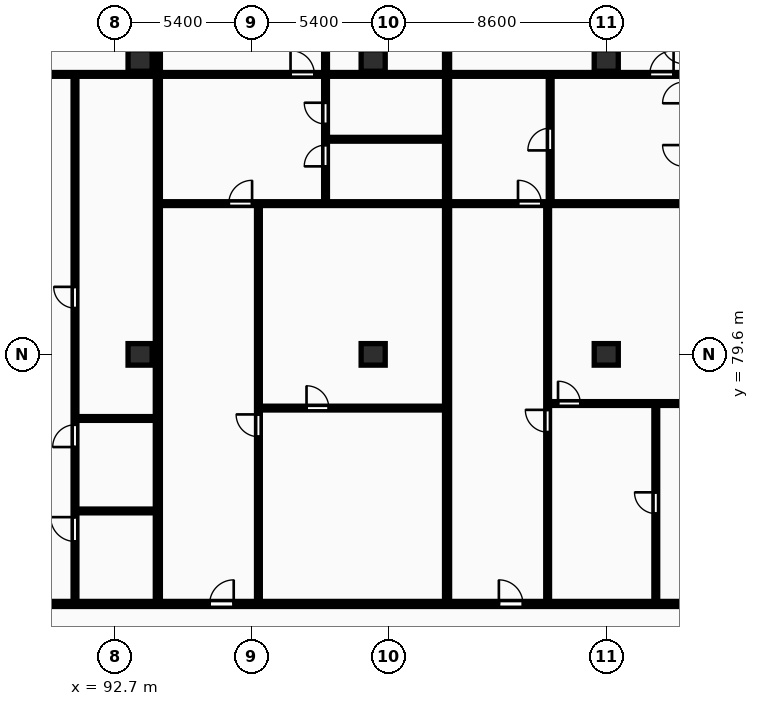
"""IFC4 building model, lengths in metres.
Left out: names, types, materials, properties, quantities, classifications, styles, units other than length and angle.
Written with IfcOpenShell. Run it as: python <this file> out.ifc"""

import sys

from ifc_helpers import new_model, si_unit, direction, frame, frame_2d, origin, origin_2d, place, context, subcontext, project, spatial, rectangle, extrude, element, fill, save


model = new_model("IFC4")
c1 = context("Model", 3, precision=1e-05, world=origin(), true_north=direction((0.0, 1.0)))
c2 = subcontext(c1, "Body", "Model", "MODEL_VIEW")
j1 = project(units=[si_unit("LENGTHUNIT", "METRE"), si_unit("PLANEANGLEUNIT", "RADIAN")], contexts=[c1])
p1 = place(None, origin())
s1 = spatial("IfcSite", under=j1, at=p1, CompositionType="ELEMENT")
p2 = place(p1, origin())
s2 = spatial("IfcBuilding", under=s1, at=p2, CompositionType="ELEMENT")
p3 = place(p2, frame((0.0, 0.0, 106.8)))
s3 = spatial("IfcBuildingStorey", under=s2, at=p3, CompositionType="ELEMENT", Elevation=106.8)
for number, where, z_axis, x_axis in (
    (1, (93.7, 79.6, 0.0), (0.0, 0.0, 1.0), (1.0, 0.0, 0.0)),
    (2, (93.7, 91.2, 0.0), (0.0, 0.0, 1.0), (1.0, 0.0, 0.0)),
    (3, (102.9, 79.6, 0.0), (0.0, 0.0, 1.0), (1.0, 0.0, 0.0)),
    (4, (102.9, 91.2, 0.0), (0.0, 0.0, 1.0), (1.0, 0.0, 0.0)),
    (5, (112.1, 79.6, 0.0), (0.0, 0.0, 1.0), (1.0, 0.0, 0.0)),
    (6, (112.1, 91.2, 0.0), (0.0, 0.0, 1.0), (1.0, 0.0, 0.0)),
):
    element("IfcColumn", number, at=place(p3, frame(where, z_axis=z_axis, x_axis=x_axis)), inside=s3, PredefinedType="COLUMN", context=c2, shape_type="SweptSolid", body=[
        extrude(rectangle(XDim=0.95, YDim=0.85, at=origin_2d()), origin(), (0.0, 0.0, 1.0), 3.25),
    ])
p4 = place(p3, frame((94.401, 69.83, 0.0), z_axis=(0.0, 0.0, 1.0), x_axis=(0.0, 1.0, 0.0)))
e7 = element("IfcWall", 7, at=p4, inside=s3, PredefinedType="PARTITIONING", context=c2, shape_type="SweptSolid", body=[
    extrude(rectangle(XDim=26.07, YDim=0.2, at=frame_2d((13.035, 0.0))), origin(), (0.0, 0.0, 1.0), 2.97),
])
for number, where, z_axis, x_axis in (
    (8, (91.191, 73.42, 0.0), (0.0, 0.0, 1.0), (1.0, 0.0, 0.0)),
    (9, (91.191, 77.07, 0.0), (0.0, 0.0, 1.0), (1.0, 0.0, 0.0)),
):
    element("IfcWall", number, at=place(p3, frame(where, z_axis=z_axis, x_axis=x_axis)), inside=s3, PredefinedType="PARTITIONING", context=c2, shape_type="SweptSolid", body=[
        extrude(rectangle(XDim=3.13, YDim=0.15, at=frame_2d((1.565, 0.0))), origin(), (0.0, 0.0, 1.0), 2.97),
    ])
p5 = place(p3, frame((91.131, 69.81, 0.0), z_axis=(0.0, 0.0, 1.0), x_axis=(0.0, 1.0, 0.0)))
e10 = element("IfcWall", 10, at=p5, inside=s3, PredefinedType="PARTITIONING", context=c2, shape_type="SweptSolid", body=[
    extrude(rectangle(XDim=20.78, YDim=0.15, at=frame_2d((10.39, 0.0))), origin(), (0.0, 0.0, 1.0), 2.97),
])
p6 = place(p5, frame((2.406, 0.0, 0.0)))
e11 = element("IfcOpeningElement", 11, at=p6, cuts=e10, PredefinedType="OPENING", context=c2, shape_type="SweptSolid", body=[
    extrude(rectangle(XDim=0.96, YDim=2.1, at=frame_2d((0.48, 1.05))), frame((0.0, 0.085, 0.0), z_axis=(0.0, -1.0, 0.0), x_axis=(1.0, 0.0, 0.0)), (0.0, 0.0, 1.0), 0.17),
])
p7 = place(p5, frame((6.133, 0.0, 0.0)))
e12 = element("IfcOpeningElement", 12, at=p7, cuts=e10, PredefinedType="OPENING", context=c2, shape_type="SweptSolid", body=[
    extrude(rectangle(XDim=0.88, YDim=2.06, at=frame_2d((0.44, 1.03))), frame((0.0, 0.085, 0.0), z_axis=(0.0, -1.0, 0.0), x_axis=(1.0, 0.0, 0.0)), (0.0, 0.0, 1.0), 0.17),
])
p8 = place(p5, frame((11.615, 0.0, 0.0)))
e13 = element("IfcOpeningElement", 13, at=p8, cuts=e10, PredefinedType="OPENING", context=c2, shape_type="SweptSolid", body=[
    extrude(rectangle(XDim=0.84, YDim=2.04, at=frame_2d((0.42, 1.02))), frame((0.0, 0.085, 0.0), z_axis=(0.0, -1.0, 0.0), x_axis=(1.0, 0.0, 0.0)), (0.0, 0.0, 1.0), 0.17),
])
p9 = place(p3, frame((75.405, 90.65, 0.0), z_axis=(0.0, 0.0, 1.0), x_axis=(1.0, 0.0, 0.0)))
e14 = element("IfcWall", 14, at=p9, inside=s3, PredefinedType="PARTITIONING", context=c2, shape_type="SweptSolid", body=[
    extrude(rectangle(XDim=18.916, YDim=0.15, at=frame_2d((9.458, 0.0))), origin(), (0.0, 0.0, 1.0), 2.97),
])
p10 = place(p9, frame((6.426, 0.0, 0.0)))
e15 = element("IfcOpeningElement", 15, at=p10, cuts=e14, PredefinedType="OPENING", context=c2, shape_type="SweptSolid", body=[
    extrude(rectangle(XDim=0.94, YDim=2.1, at=frame_2d((0.47, 1.05))), frame((0.0, 0.085, 0.0), z_axis=(0.0, -1.0, 0.0), x_axis=(1.0, 0.0, 0.0)), (0.0, 0.0, 1.0), 0.17),
])
p11 = place(p9, frame((10.856, 0.0, 0.0)))
e16 = element("IfcOpeningElement", 16, at=p11, cuts=e14, PredefinedType="OPENING", context=c2, shape_type="SweptSolid", body=[
    extrude(rectangle(XDim=0.94, YDim=2.1, at=frame_2d((0.47, 1.05))), frame((0.0, 0.085, 0.0), z_axis=(0.0, -1.0, 0.0), x_axis=(1.0, 0.0, 0.0)), (0.0, 0.0, 1.0), 0.17),
])
p12 = place(p3, frame((105.817, 69.83, 0.0), z_axis=(0.0, 0.0, 1.0), x_axis=(0.0, 1.0, 0.0)))
e17 = element("IfcWall", 17, at=p12, inside=s3, PredefinedType="PARTITIONING", context=c2, shape_type="SweptSolid", body=[
    extrude(rectangle(XDim=26.07, YDim=0.2, at=frame_2d((13.035, 0.0))), origin(), (0.0, 0.0, 1.0), 2.97),
])
p13 = place(p3, frame((98.431, 77.48, 0.0), z_axis=(0.0, 0.0, 1.0), x_axis=(1.0, 0.0, 0.0)))
e18 = element("IfcWall", 18, at=p13, inside=s3, PredefinedType="PARTITIONING", context=c2, shape_type="SweptSolid", body=[
    extrude(rectangle(XDim=7.306, YDim=0.15, at=frame_2d((3.653, 0.0))), origin(), (0.0, 0.0, 1.0), 2.97),
])
p14 = place(p13, frame((1.839, 0.0, 0.0)))
e19 = element("IfcOpeningElement", 19, at=p14, cuts=e18, PredefinedType="OPENING", context=c2, shape_type="SweptSolid", body=[
    extrude(rectangle(XDim=0.88, YDim=2.06, at=frame_2d((0.44, 1.03))), frame((0.0, 0.085, 0.0), z_axis=(0.0, -1.0, 0.0), x_axis=(1.0, 0.0, 0.0)), (0.0, 0.0, 1.0), 0.17),
])
p15 = place(p3, frame((98.371, 69.81, 0.0), z_axis=(0.0, 0.0, 1.0), x_axis=(0.0, 1.0, 0.0)))
e20 = element("IfcWall", 20, at=p15, inside=s3, PredefinedType="PARTITIONING", context=c2, shape_type="SweptSolid", body=[
    extrude(rectangle(XDim=15.7, YDim=0.15, at=frame_2d((7.85, 0.0))), origin(), (0.0, 0.0, 1.0), 2.97),
])
p16 = place(p15, frame((6.54, 0.0, 0.0)))
e21 = element("IfcOpeningElement", 21, at=p16, cuts=e20, PredefinedType="OPENING", context=c2, shape_type="SweptSolid", body=[
    extrude(rectangle(XDim=0.88, YDim=2.06, at=frame_2d((0.44, 1.03))), frame((0.0, 0.085, 0.0), z_axis=(0.0, -1.0, 0.0), x_axis=(1.0, 0.0, 0.0)), (0.0, 0.0, 1.0), 0.17),
])
p17 = place(p3, frame((101.08, 88.09, 0.0), z_axis=(0.0, 0.0, 1.0), x_axis=(1.0, 0.0, 0.0)))
e22 = element("IfcWall", 22, at=p17, inside=s3, PredefinedType="PARTITIONING", context=c2, shape_type="SweptSolid", body=[
    extrude(rectangle(XDim=4.656, YDim=0.15, at=frame_2d((2.328, 0.0))), origin(), (0.0, 0.0, 1.0), 2.97),
])
p18 = place(p3, frame((101.02, 85.59, 0.0), z_axis=(0.0, 0.0, 1.0), x_axis=(0.0, 1.0, 0.0)))
e23 = element("IfcWall", 23, at=p18, inside=s3, PredefinedType="PARTITIONING", context=c2, shape_type="SweptSolid", body=[
    extrude(rectangle(XDim=10.31, YDim=0.15, at=frame_2d((5.155, 0.0))), origin(), (0.0, 0.0, 1.0), 2.97),
])
p19 = place(p18, frame((1.43, 0.0, 0.0)))
e24 = element("IfcOpeningElement", 24, at=p19, cuts=e23, PredefinedType="OPENING", context=c2, shape_type="SweptSolid", body=[
    extrude(rectangle(XDim=0.84, YDim=2.04, at=frame_2d((0.42, 1.02))), frame((0.0, 0.085, 0.0), z_axis=(0.0, -1.0, 0.0), x_axis=(1.0, 0.0, 0.0)), (0.0, 0.0, 1.0), 0.17),
])
p20 = place(p18, frame((3.102, 0.0, 0.0)))
e25 = element("IfcOpeningElement", 25, at=p20, cuts=e23, PredefinedType="OPENING", context=c2, shape_type="SweptSolid", body=[
    extrude(rectangle(XDim=0.84, YDim=2.04, at=frame_2d((0.42, 1.02))), frame((0.0, 0.085, 0.0), z_axis=(0.0, -1.0, 0.0), x_axis=(1.0, 0.0, 0.0)), (0.0, 0.0, 1.0), 0.17),
])
p21 = place(p18, frame((7.29, 0.0, 0.0)))
e26 = element("IfcOpeningElement", 26, at=p21, cuts=e23, PredefinedType="OPENING", context=c2, shape_type="SweptSolid", body=[
    extrude(rectangle(XDim=0.88, YDim=2.06, at=frame_2d((0.44, 1.03))), frame((0.0, 0.085, 0.0), z_axis=(0.0, -1.0, 0.0), x_axis=(1.0, 0.0, 0.0)), (0.0, 0.0, 1.0), 0.17),
])
p22 = place(p3, frame((94.481, 85.55, 0.0), z_axis=(0.0, 0.0, 1.0), x_axis=(1.0, 0.0, 0.0)))
e27 = element("IfcWall", 27, at=p22, inside=s3, PredefinedType="PARTITIONING", context=c2, shape_type="SweptSolid", body=[
    extrude(rectangle(XDim=11.256, YDim=0.15, at=frame_2d((5.628, 0.0))), origin(), (0.0, 0.0, 1.0), 2.97),
])
p23 = place(p22, frame((2.72, 0.0, 0.0)))
e28 = element("IfcOpeningElement", 28, at=p23, cuts=e27, PredefinedType="OPENING", context=c2, shape_type="SweptSolid", body=[
    extrude(rectangle(XDim=0.92, YDim=2.08, at=frame_2d((0.46, 1.04))), frame((0.0, 0.085, 0.0), z_axis=(0.0, -1.0, 0.0), x_axis=(1.0, 0.0, 0.0)), (0.0, 0.0, 1.0), 0.17),
])
p24 = place(p3, frame((94.481, 90.65, 0.0), z_axis=(0.0, 0.0, 1.0), x_axis=(1.0, 0.0, 0.0)))
e29 = element("IfcWall", 29, at=p24, inside=s3, PredefinedType="PARTITIONING", context=c2, shape_type="SweptSolid", body=[
    extrude(rectangle(XDim=11.256, YDim=0.15, at=frame_2d((5.628, 0.0))), origin(), (0.0, 0.0, 1.0), 2.97),
])
p25 = place(p24, frame((5.158, 0.0, 0.0)))
e30 = element("IfcOpeningElement", 30, at=p25, cuts=e29, PredefinedType="OPENING", context=c2, shape_type="SweptSolid", body=[
    extrude(rectangle(XDim=0.94, YDim=2.1, at=frame_2d((0.47, 1.05))), frame((0.0, 0.085, 0.0), z_axis=(0.0, -1.0, 0.0), x_axis=(1.0, 0.0, 0.0)), (0.0, 0.0, 1.0), 0.17),
])
p26 = place(p3, frame((114.055, 69.81, 0.0), z_axis=(0.0, 0.0, 1.0), x_axis=(0.0, 1.0, 0.0)))
e31 = element("IfcWall", 31, at=p26, inside=s3, PredefinedType="PARTITIONING", context=c2, shape_type="SweptSolid", body=[
    extrude(rectangle(XDim=7.85, YDim=0.15, at=frame_2d((3.925, 0.0))), origin(), (0.0, 0.0, 1.0), 2.97),
])
p27 = place(p26, frame((3.505, 0.0, 0.0)))
e32 = element("IfcOpeningElement", 32, at=p27, cuts=e31, PredefinedType="OPENING", context=c2, shape_type="SweptSolid", body=[
    extrude(rectangle(XDim=0.84, YDim=2.04, at=frame_2d((0.42, 1.02))), frame((0.0, 0.085, 0.0), z_axis=(0.0, -1.0, 0.0), x_axis=(1.0, 0.0, 0.0)), (0.0, 0.0, 1.0), 0.17),
])
p28 = place(p3, frame((109.847, 77.66, 0.0), z_axis=(0.0, 0.0, 1.0), x_axis=(1.0, 0.0, 0.0)))
e33 = element("IfcWall", 33, at=p28, inside=s3, PredefinedType="PARTITIONING", context=c2, shape_type="SweptSolid", body=[
    extrude(rectangle(XDim=8.657, YDim=0.15, at=frame_2d((4.329, 0.0))), origin(), (0.0, 0.0, 1.0), 2.97),
])
p29 = place(p28, frame((0.35, 0.0, 0.0)))
e34 = element("IfcOpeningElement", 34, at=p29, cuts=e33, PredefinedType="OPENING", context=c2, shape_type="SweptSolid", body=[
    extrude(rectangle(XDim=0.88, YDim=2.06, at=frame_2d((0.44, 1.03))), frame((0.0, 0.085, 0.0), z_axis=(0.0, -1.0, 0.0), x_axis=(1.0, 0.0, 0.0)), (0.0, 0.0, 1.0), 0.17),
])
p30 = place(p3, frame((109.787, 69.81, 0.0), z_axis=(0.0, 0.0, 1.0), x_axis=(0.0, 1.0, 0.0)))
e35 = element("IfcWall", 35, at=p30, inside=s3, PredefinedType="PARTITIONING", context=c2, shape_type="SweptSolid", body=[
    extrude(rectangle(XDim=15.7, YDim=0.15, at=frame_2d((7.85, 0.0))), origin(), (0.0, 0.0, 1.0), 2.97),
])
p31 = place(p30, frame((6.72, 0.0, 0.0)))
e36 = element("IfcOpeningElement", 36, at=p31, cuts=e35, PredefinedType="OPENING", context=c2, shape_type="SweptSolid", body=[
    extrude(rectangle(XDim=0.88, YDim=2.06, at=frame_2d((0.44, 1.03))), frame((0.0, 0.085, 0.0), z_axis=(0.0, -1.0, 0.0), x_axis=(1.0, 0.0, 0.0)), (0.0, 0.0, 1.0), 0.17),
])
p32 = place(p3, frame((109.887, 85.59, 0.0), z_axis=(0.0, 0.0, 1.0), x_axis=(0.0, 1.0, 0.0)))
e37 = element("IfcWall", 37, at=p32, inside=s3, PredefinedType="PARTITIONING", context=c2, shape_type="SweptSolid", body=[
    extrude(rectangle(XDim=5.0, YDim=0.15, at=frame_2d((2.5, 0.0))), origin(), (0.0, 0.0, 1.0), 2.97),
])
p33 = place(p32, frame((2.06, 0.0, 0.0)))
e38 = element("IfcOpeningElement", 38, at=p33, cuts=e37, PredefinedType="OPENING", context=c2, shape_type="SweptSolid", body=[
    extrude(rectangle(XDim=0.88, YDim=2.06, at=frame_2d((0.44, 1.03))), frame((0.0, 0.085, 0.0), z_axis=(0.0, -1.0, 0.0), x_axis=(1.0, 0.0, 0.0)), (0.0, 0.0, 1.0), 0.17),
])
p34 = place(p3, frame((105.896, 85.55, 0.0), z_axis=(0.0, 0.0, 1.0), x_axis=(1.0, 0.0, 0.0)))
e39 = element("IfcWall", 39, at=p34, inside=s3, PredefinedType="PARTITIONING", context=c2, shape_type="SweptSolid", body=[
    extrude(rectangle(XDim=12.607, YDim=0.15, at=frame_2d((6.304, 0.0))), origin(), (0.0, 0.0, 1.0), 2.97),
])
p35 = place(p34, frame((2.72, 0.0, 0.0)))
e40 = element("IfcOpeningElement", 40, at=p35, cuts=e39, PredefinedType="OPENING", context=c2, shape_type="SweptSolid", body=[
    extrude(rectangle(XDim=0.92, YDim=2.08, at=frame_2d((0.46, 1.04))), frame((0.0, 0.085, 0.0), z_axis=(0.0, -1.0, 0.0), x_axis=(1.0, 0.0, 0.0)), (0.0, 0.0, 1.0), 0.17),
])
p36 = place(p3, frame((105.896, 90.65, 0.0), z_axis=(0.0, 0.0, 1.0), x_axis=(1.0, 0.0, 0.0)))
e41 = element("IfcWall", 41, at=p36, inside=s3, PredefinedType="PARTITIONING", context=c2, shape_type="SweptSolid", body=[
    extrude(rectangle(XDim=12.607, YDim=0.15, at=frame_2d((6.304, 0.0))), origin(), (0.0, 0.0, 1.0), 2.97),
])
p37 = place(p36, frame((7.921, 0.0, 0.0)))
e42 = element("IfcOpeningElement", 42, at=p37, cuts=e41, PredefinedType="OPENING", context=c2, shape_type="SweptSolid", body=[
    extrude(rectangle(XDim=0.94, YDim=2.1, at=frame_2d((0.47, 1.05))), frame((0.0, 0.085, 0.0), z_axis=(0.0, -1.0, 0.0), x_axis=(1.0, 0.0, 0.0)), (0.0, 0.0, 1.0), 0.17),
])
p38 = place(p3, frame((57.6, 69.75, 0.0), z_axis=(0.0, 0.0, 1.0), x_axis=(1.0, 0.0, 0.0)))
e43 = element("IfcWall", 43, at=p38, inside=s3, PredefinedType="PARTITIONING", context=c2, shape_type="SweptSolid", body=[
    extrude(rectangle(XDim=73.0, YDim=0.2, at=frame_2d((36.5, 0.0))), origin(), (0.0, 0.0, 1.0), 2.97),
])
p39 = place(p38, frame((7.172, 0.0, 0.0)))
e44 = element("IfcOpeningElement", 44, at=p39, cuts=e43, PredefinedType="OPENING", context=c2, shape_type="SweptSolid", body=[
    extrude(rectangle(XDim=1.22, YDim=2.18, at=frame_2d((0.61, 1.09))), frame((0.0, 0.11, 0.0), z_axis=(0.0, -1.0, 0.0), x_axis=(1.0, 0.0, 0.0)), (0.0, 0.0, 1.0), 0.22),
])
p40 = place(p38, frame((23.96, 0.0, 0.0)))
e45 = element("IfcOpeningElement", 45, at=p40, cuts=e43, PredefinedType="OPENING", context=c2, shape_type="SweptSolid", body=[
    extrude(rectangle(XDim=1.22, YDim=2.18, at=frame_2d((0.61, 1.09))), frame((0.0, 0.11, 0.0), z_axis=(0.0, -1.0, 0.0), x_axis=(1.0, 0.0, 0.0)), (0.0, 0.0, 1.0), 0.22),
])
p41 = place(p38, frame((38.846, 0.0, 0.0)))
e46 = element("IfcOpeningElement", 46, at=p41, cuts=e43, PredefinedType="OPENING", context=c2, shape_type="SweptSolid", body=[
    extrude(rectangle(XDim=0.95, YDim=2.15, at=frame_2d((0.475, 1.075))), frame((0.0, 0.11, 0.0), z_axis=(0.0, -1.0, 0.0), x_axis=(1.0, 0.0, 0.0)), (0.0, 0.0, 1.0), 0.22),
])
p42 = place(p38, frame((50.262, 0.0, 0.0)))
e47 = element("IfcOpeningElement", 47, at=p42, cuts=e43, PredefinedType="OPENING", context=c2, shape_type="SweptSolid", body=[
    extrude(rectangle(XDim=0.95, YDim=2.15, at=frame_2d((0.475, 1.075))), frame((0.0, 0.11, 0.0), z_axis=(0.0, -1.0, 0.0), x_axis=(1.0, 0.0, 0.0)), (0.0, 0.0, 1.0), 0.22),
])
p43 = place(p38, frame((63.754, 0.0, 0.0)))
e48 = element("IfcOpeningElement", 48, at=p43, cuts=e43, PredefinedType="OPENING", context=c2, shape_type="SweptSolid", body=[
    extrude(rectangle(XDim=0.95, YDim=2.15, at=frame_2d((0.475, 1.075))), frame((0.0, 0.11, 0.0), z_axis=(0.0, -1.0, 0.0), x_axis=(1.0, 0.0, 0.0)), (0.0, 0.0, 1.0), 0.22),
])
p44 = place(p6, origin())
e49 = element("IfcDoor", 49, at=p44, inside=s3, OperationType="SINGLE_SWING_RIGHT", PredefinedType="DOOR", context=c2, shape_type="SweptSolid", body=[
    extrude(rectangle(XDim=0.96, YDim=2.1, at=frame_2d((0.48, 1.05))), frame((0.0, 0.025, 0.0), z_axis=(0.0, -1.0, 0.0), x_axis=(1.0, 0.0, 0.0)), (0.0, 0.0, 1.0), 0.05),
])
fill(e11, e49)
p45 = place(p7, origin())
e50 = element("IfcDoor", 50, at=p45, inside=s3, OperationType="SINGLE_SWING_LEFT", PredefinedType="DOOR", context=c2, shape_type="SweptSolid", body=[
    extrude(rectangle(XDim=0.88, YDim=2.06, at=frame_2d((0.44, 1.03))), frame((0.0, 0.025, 0.0), z_axis=(0.0, -1.0, 0.0), x_axis=(1.0, 0.0, 0.0)), (0.0, 0.0, 1.0), 0.05),
])
fill(e12, e50)
p46 = place(p8, origin())
e51 = element("IfcDoor", 51, at=p46, inside=s3, OperationType="SINGLE_SWING_RIGHT", PredefinedType="DOOR", context=c2, shape_type="SweptSolid", body=[
    extrude(rectangle(XDim=0.84, YDim=2.04, at=frame_2d((0.42, 1.02))), frame((0.0, 0.025, 0.0), z_axis=(0.0, -1.0, 0.0), x_axis=(1.0, 0.0, 0.0)), (0.0, 0.0, 1.0), 0.05),
])
fill(e13, e51)
p47 = place(p14, origin())
e52 = element("IfcDoor", 52, at=p47, inside=s3, OperationType="SINGLE_SWING_LEFT", PredefinedType="DOOR", context=c2, shape_type="SweptSolid", body=[
    extrude(rectangle(XDim=0.88, YDim=2.06, at=frame_2d((0.44, 1.03))), frame((0.0, 0.025, 0.0), z_axis=(0.0, -1.0, 0.0), x_axis=(1.0, 0.0, 0.0)), (0.0, 0.0, 1.0), 0.05),
])
fill(e19, e52)
p48 = place(p16, origin())
e53 = element("IfcDoor", 53, at=p48, inside=s3, OperationType="SINGLE_SWING_RIGHT", PredefinedType="DOOR", context=c2, shape_type="SweptSolid", body=[
    extrude(rectangle(XDim=0.88, YDim=2.06, at=frame_2d((0.44, 1.03))), frame((0.0, 0.025, 0.0), z_axis=(0.0, -1.0, 0.0), x_axis=(1.0, 0.0, 0.0)), (0.0, 0.0, 1.0), 0.05),
])
fill(e21, e53)
p49 = place(p19, origin())
e54 = element("IfcDoor", 54, at=p49, inside=s3, OperationType="SINGLE_SWING_LEFT", PredefinedType="DOOR", context=c2, shape_type="SweptSolid", body=[
    extrude(rectangle(XDim=0.84, YDim=2.04, at=frame_2d((0.42, 1.02))), frame((0.0, 0.025, 0.0), z_axis=(0.0, -1.0, 0.0), x_axis=(1.0, 0.0, 0.0)), (0.0, 0.0, 1.0), 0.05),
])
fill(e24, e54)
p50 = place(p20, origin())
e55 = element("IfcDoor", 55, at=p50, inside=s3, OperationType="SINGLE_SWING_RIGHT", PredefinedType="DOOR", context=c2, shape_type="SweptSolid", body=[
    extrude(rectangle(XDim=0.84, YDim=2.04, at=frame_2d((0.42, 1.02))), frame((0.0, 0.025, 0.0), z_axis=(0.0, -1.0, 0.0), x_axis=(1.0, 0.0, 0.0)), (0.0, 0.0, 1.0), 0.05),
])
fill(e25, e55)
p51 = place(p23, origin())
e56 = element("IfcDoor", 56, at=p51, inside=s3, OperationType="SINGLE_SWING_RIGHT", PredefinedType="DOOR", context=c2, shape_type="SweptSolid", body=[
    extrude(rectangle(XDim=0.92, YDim=2.08, at=frame_2d((0.46, 1.04))), frame((0.0, 0.025, 0.0), z_axis=(0.0, -1.0, 0.0), x_axis=(1.0, 0.0, 0.0)), (0.0, 0.0, 1.0), 0.05),
])
fill(e28, e56)
p52 = place(p25, origin())
e57 = element("IfcDoor", 57, at=p52, inside=s3, OperationType="SINGLE_SWING_LEFT", PredefinedType="DOOR", context=c2, shape_type="SweptSolid", body=[
    extrude(rectangle(XDim=0.94, YDim=2.1, at=frame_2d((0.47, 1.05))), frame((0.0, 0.025, 0.0), z_axis=(0.0, -1.0, 0.0), x_axis=(1.0, 0.0, 0.0)), (0.0, 0.0, 1.0), 0.05),
])
fill(e30, e57)
p53 = place(p27, origin())
e58 = element("IfcDoor", 58, at=p53, inside=s3, OperationType="SINGLE_SWING_RIGHT", PredefinedType="DOOR", context=c2, shape_type="SweptSolid", body=[
    extrude(rectangle(XDim=0.84, YDim=2.04, at=frame_2d((0.42, 1.02))), frame((0.0, 0.025, 0.0), z_axis=(0.0, -1.0, 0.0), x_axis=(1.0, 0.0, 0.0)), (0.0, 0.0, 1.0), 0.05),
])
fill(e32, e58)
p54 = place(p29, origin())
e59 = element("IfcDoor", 59, at=p54, inside=s3, OperationType="SINGLE_SWING_LEFT", PredefinedType="DOOR", context=c2, shape_type="SweptSolid", body=[
    extrude(rectangle(XDim=0.88, YDim=2.06, at=frame_2d((0.44, 1.03))), frame((0.0, 0.025, 0.0), z_axis=(0.0, -1.0, 0.0), x_axis=(1.0, 0.0, 0.0)), (0.0, 0.0, 1.0), 0.05),
])
fill(e34, e59)
p55 = place(p31, origin())
e60 = element("IfcDoor", 60, at=p55, inside=s3, OperationType="SINGLE_SWING_RIGHT", PredefinedType="DOOR", context=c2, shape_type="SweptSolid", body=[
    extrude(rectangle(XDim=0.88, YDim=2.06, at=frame_2d((0.44, 1.03))), frame((0.0, 0.025, 0.0), z_axis=(0.0, -1.0, 0.0), x_axis=(1.0, 0.0, 0.0)), (0.0, 0.0, 1.0), 0.05),
])
fill(e36, e60)
p56 = place(p33, origin())
e61 = element("IfcDoor", 61, at=p56, inside=s3, OperationType="SINGLE_SWING_LEFT", PredefinedType="DOOR", context=c2, shape_type="SweptSolid", body=[
    extrude(rectangle(XDim=0.88, YDim=2.06, at=frame_2d((0.44, 1.03))), frame((0.0, 0.025, 0.0), z_axis=(0.0, -1.0, 0.0), x_axis=(1.0, 0.0, 0.0)), (0.0, 0.0, 1.0), 0.05),
])
fill(e38, e61)
p57 = place(p35, origin())
e62 = element("IfcDoor", 62, at=p57, inside=s3, OperationType="SINGLE_SWING_LEFT", PredefinedType="DOOR", context=c2, shape_type="SweptSolid", body=[
    extrude(rectangle(XDim=0.92, YDim=2.08, at=frame_2d((0.46, 1.04))), frame((0.0, 0.025, 0.0), z_axis=(0.0, -1.0, 0.0), x_axis=(1.0, 0.0, 0.0)), (0.0, 0.0, 1.0), 0.05),
])
fill(e40, e62)
p58 = place(p37, origin())
e63 = element("IfcDoor", 63, at=p58, inside=s3, OperationType="SINGLE_SWING_RIGHT", PredefinedType="DOOR", context=c2, shape_type="SweptSolid", body=[
    extrude(rectangle(XDim=0.94, YDim=2.1, at=frame_2d((0.47, 1.05))), frame((0.0, 0.025, 0.0), z_axis=(0.0, -1.0, 0.0), x_axis=(1.0, 0.0, 0.0)), (0.0, 0.0, 1.0), 0.05),
])
fill(e42, e63)
p59 = place(p41, origin())
e64 = element("IfcDoor", 64, at=p59, inside=s3, OperationType="SINGLE_SWING_RIGHT", PredefinedType="DOOR", context=c2, shape_type="SweptSolid", body=[
    extrude(rectangle(XDim=0.95, YDim=2.15, at=frame_2d((0.475, 1.075))), frame((0.0, 0.025, 0.0), z_axis=(0.0, -1.0, 0.0), x_axis=(1.0, 0.0, 0.0)), (0.0, 0.0, 1.0), 0.05),
])
fill(e46, e64)
p60 = place(p42, origin())
e65 = element("IfcDoor", 65, at=p60, inside=s3, OperationType="SINGLE_SWING_LEFT", PredefinedType="DOOR", context=c2, shape_type="SweptSolid", body=[
    extrude(rectangle(XDim=0.95, YDim=2.15, at=frame_2d((0.475, 1.075))), frame((0.0, 0.025, 0.0), z_axis=(0.0, -1.0, 0.0), x_axis=(1.0, 0.0, 0.0)), (0.0, 0.0, 1.0), 0.05),
])
fill(e47, e65)
save(model, sys.argv[1])
